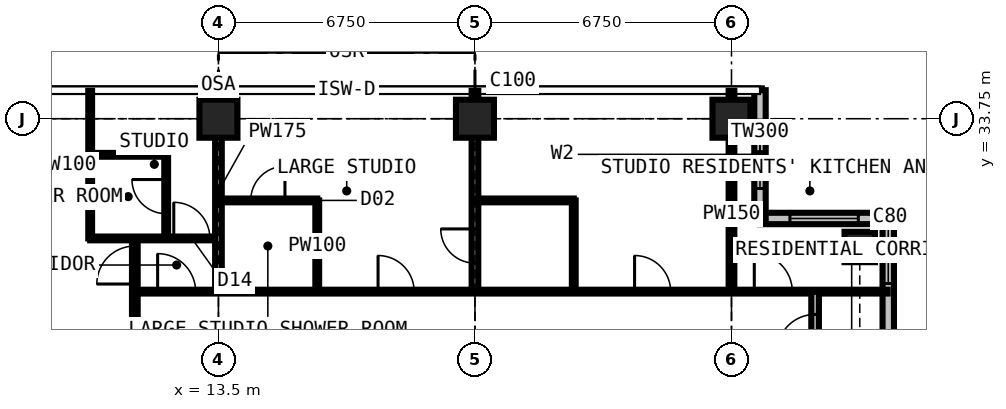
"""IFC4 building model, lengths in metres.
Left out: names, types, materials, properties, quantities, classifications, styles, units other than length and angle.
Written with IfcOpenShell. Run it as: python <this file> out.ifc"""

import sys

from ifc_helpers import new_model, si_unit, direction, frame, frame_2d, origin, origin_2d, place, context, subcontext, project, spatial, rectangle, extrude, element, fill, save


model = new_model("IFC4")
c1 = context("Model", 3, precision=1e-05, world=origin(), true_north=direction((0.0, 1.0)))
c2 = subcontext(c1, "Body", "Model", "MODEL_VIEW")
j1 = project(units=[si_unit("LENGTHUNIT", "METRE"), si_unit("PLANEANGLEUNIT", "RADIAN")], contexts=[c1])
p1 = place(None, origin())
s1 = spatial("IfcSite", under=j1, at=p1, CompositionType="ELEMENT")
p2 = place(p1, origin())
s2 = spatial("IfcBuilding", under=s1, at=p2, CompositionType="ELEMENT")
p3 = place(p2, frame((0.0, 0.0, 236.7)))
s3 = spatial("IfcBuildingStorey", under=s2, at=p3, CompositionType="ELEMENT", Elevation=236.7)
for number, where, z_axis, x_axis in (
    (1, (13.5, 33.75, 0.0), (0.0, 0.0, 1.0), (1.0, 0.0, 0.0)),
    (2, (20.25, 33.75, 0.0), (0.0, 0.0, 1.0), (1.0, 0.0, 0.0)),
    (3, (27.0, 33.75, 0.0), (0.0, 0.0, 1.0), (1.0, 0.0, 0.0)),
):
    element("IfcColumn", number, at=place(p3, frame(where, z_axis=z_axis, x_axis=x_axis)), inside=s3, PredefinedType="COLUMN", context=c2, shape_type="SweptSolid", body=[
        extrude(rectangle(XDim=1.0, YDim=1.0, at=origin_2d()), origin(), (0.0, 0.0, 1.0), 3.6),
    ])
p4 = place(p3, frame((30.375, 30.375, 0.0), z_axis=(0.0, 0.0, 1.0), x_axis=(1.0, 0.0, 0.0)))
e4 = element("IfcColumn", 4, at=p4, inside=s3, PredefinedType="COLUMN", context=c2, shape_type="SweptSolid", body=[
    extrude(rectangle(XDim=0.8, YDim=0.8, at=origin_2d()), origin(), (0.0, 0.0, 1.0), 3.6),
])
p5 = place(p3, frame((31.125, 27.75, 0.0), z_axis=(0.0, 0.0, 1.0), x_axis=(0.0, 1.0, 0.0)))
e5 = element("IfcWall", 5, at=p5, inside=s3, PredefinedType="SOLIDWALL", context=c2, shape_type="SweptSolid", body=[
    extrude(rectangle(XDim=3.375, YDim=0.3, at=frame_2d((1.688, 0.0))), origin(), (0.0, 0.0, 1.0), 3.375),
])
p6 = place(p5, frame((1.663, 0.0, 0.9)))
e6 = element("IfcOpeningElement", 6, at=p6, cuts=e5, PredefinedType="OPENING", context=c2, shape_type="SweptSolid", body=[
    extrude(rectangle(XDim=1.5, YDim=1.8, at=frame_2d((0.75, 0.9))), frame((0.0, 0.16, 0.0), z_axis=(0.0, -1.0, 0.0), x_axis=(1.0, 0.0, 0.0)), (0.0, 0.0, 1.0), 0.32),
])
p7 = place(p3, frame((31.125, 31.125, 0.0), z_axis=(0.0, 0.0, 1.0), x_axis=(-1.0, 0.0, 0.0)))
e7 = element("IfcWall", 7, at=p7, inside=s3, PredefinedType="SOLIDWALL", context=c2, shape_type="SweptSolid", body=[
    extrude(rectangle(XDim=3.375, YDim=0.3, at=frame_2d((1.688, 0.0))), origin(), (0.0, 0.0, 1.0), 3.375),
])
p8 = place(p7, frame((0.788, 0.0, 0.6)))
e8 = element("IfcOpeningElement", 8, at=p8, cuts=e7, PredefinedType="OPENING", context=c2, shape_type="SweptSolid", body=[
    extrude(rectangle(XDim=1.8, YDim=2.1, at=frame_2d((0.9, 1.05))), frame((0.0, 0.16, 0.0), z_axis=(0.0, -1.0, 0.0), x_axis=(1.0, 0.0, 0.0)), (0.0, 0.0, 1.0), 0.32),
])
p9 = place(p3, frame((27.75, 31.125, 0.0), z_axis=(0.0, 0.0, 1.0), x_axis=(0.0, 1.0, 0.0)))
e9 = element("IfcWall", 9, at=p9, inside=s3, PredefinedType="SOLIDWALL", context=c2, shape_type="SweptSolid", body=[
    extrude(rectangle(XDim=3.375, YDim=0.3, at=frame_2d((1.688, 0.0))), origin(), (0.0, 0.0, 1.0), 3.375),
])
p10 = place(p9, frame((0.788, 0.0, 0.6)))
e10 = element("IfcOpeningElement", 10, at=p10, cuts=e9, PredefinedType="OPENING", context=c2, shape_type="SweptSolid", body=[
    extrude(rectangle(XDim=1.8, YDim=2.1, at=frame_2d((0.9, 1.05))), frame((0.0, 0.16, 0.0), z_axis=(0.0, -1.0, 0.0), x_axis=(1.0, 0.0, 0.0)), (0.0, 0.0, 1.0), 0.32),
])
p11 = place(p3, frame((10.125, 30.6, 0.0), z_axis=(0.0, 0.0, 1.0), x_axis=(0.0, 1.0, 0.0)))
e11 = element("IfcWall", 11, at=p11, inside=s3, PredefinedType="PARTITIONING", context=c2, shape_type="SweptSolid", body=[
    extrude(rectangle(XDim=3.884, YDim=0.1, at=frame_2d((1.942, 0.0))), origin(), (0.0, 0.0, 1.0), 3.375),
])
p12 = place(p3, frame((10.125, 30.6, 0.0), z_axis=(0.0, 0.0, 1.0), x_axis=(1.0, 0.0, 0.0)))
e12 = element("IfcWall", 12, at=p12, inside=s3, PredefinedType="PARTITIONING", context=c2, shape_type="SweptSolid", body=[
    extrude(rectangle(XDim=3.375, YDim=0.1, at=frame_2d((1.688, 0.0))), origin(), (0.0, 0.0, 1.0), 3.375),
])
p13 = place(p12, frame((2.2, 0.0, 0.0)))
e13 = element("IfcOpeningElement", 13, at=p13, cuts=e12, PredefinedType="OPENING", context=c2, shape_type="SweptSolid", body=[
    extrude(rectangle(XDim=0.95, YDim=2.2, at=frame_2d((0.475, 1.1))), frame((0.0, 0.06, 0.0), z_axis=(0.0, -1.0, 0.0), x_axis=(1.0, 0.0, 0.0)), (0.0, 0.0, 1.0), 0.12),
])
p14 = place(p3, frame((10.125, 32.8, 0.0), z_axis=(0.0, 0.0, 1.0), x_axis=(1.0, 0.0, 0.0)))
e14 = element("IfcWall", 14, at=p14, inside=s3, PredefinedType="PARTITIONING", context=c2, shape_type="SweptSolid", body=[
    extrude(rectangle(XDim=2.0, YDim=0.1, at=frame_2d((1.0, 0.0))), origin(), (0.0, 0.0, 1.0), 3.375),
])
p15 = place(p3, frame((11.3, 11.3, 0.0), z_axis=(0.0, 0.0, 1.0), x_axis=(0.0, 1.0, 0.0)))
e15 = element("IfcWall", 15, at=p15, inside=s3, PredefinedType="PARTITIONING", context=c2, shape_type="SweptSolid", body=[
    extrude(rectangle(XDim=19.3, YDim=0.15, at=frame_2d((9.65, 0.0))), origin(), (0.0, 0.0, 1.0), 3.375),
])
p16 = place(p15, frame((18.1, 0.0, 0.0)))
e16 = element("IfcOpeningElement", 16, at=p16, cuts=e15, PredefinedType="OPENING", context=c2, shape_type="SweptSolid", body=[
    extrude(rectangle(XDim=1.0, YDim=2.2, at=frame_2d((0.5, 1.1))), frame((0.0, 0.085, 0.0), z_axis=(0.0, -1.0, 0.0), x_axis=(1.0, 0.0, 0.0)), (0.0, 0.0, 1.0), 0.17),
])
p17 = place(p15, frame((10.137, 0.0, 0.0)))
e17 = element("IfcOpeningElement", 17, at=p17, cuts=e15, PredefinedType="OPENING", context=c2, shape_type="SweptSolid", body=[
    extrude(rectangle(XDim=1.0, YDim=2.2, at=frame_2d((0.5, 1.1))), frame((0.0, 0.085, 0.0), z_axis=(0.0, -1.0, 0.0), x_axis=(1.0, 0.0, 0.0)), (0.0, 0.0, 1.0), 0.17),
])
p18 = place(p3, frame((11.3, 29.2, 0.0), z_axis=(0.0, 0.0, 1.0), x_axis=(1.0, 0.0, 0.0)))
e18 = element("IfcWall", 18, at=p18, inside=s3, PredefinedType="PARTITIONING", context=c2, shape_type="SweptSolid", body=[
    extrude(rectangle(XDim=19.809, YDim=0.1, at=frame_2d((9.904, 0.0))), origin(), (0.0, 0.0, 1.0), 3.375),
])
p19 = place(p18, frame((16.3, 0.0, 0.0)))
e19 = element("IfcOpeningElement", 19, at=p19, cuts=e18, PredefinedType="OPENING", context=c2, shape_type="SweptSolid", body=[
    extrude(rectangle(XDim=1.0, YDim=2.2, at=frame_2d((0.5, 1.1))), frame((0.0, 0.06, 0.0), z_axis=(0.0, -1.0, 0.0), x_axis=(1.0, 0.0, 0.0)), (0.0, 0.0, 1.0), 0.12),
])
p20 = place(p18, frame((6.4, 0.0, 0.0)))
e20 = element("IfcOpeningElement", 20, at=p20, cuts=e18, PredefinedType="OPENING", context=c2, shape_type="SweptSolid", body=[
    extrude(rectangle(XDim=0.95, YDim=2.2, at=frame_2d((0.475, 1.1))), frame((0.0, 0.06, 0.0), z_axis=(0.0, -1.0, 0.0), x_axis=(1.0, 0.0, 0.0)), (0.0, 0.0, 1.0), 0.12),
])
p21 = place(p18, frame((13.15, 0.0, 0.0)))
e21 = element("IfcOpeningElement", 21, at=p21, cuts=e18, PredefinedType="OPENING", context=c2, shape_type="SweptSolid", body=[
    extrude(rectangle(XDim=0.95, YDim=2.2, at=frame_2d((0.475, 1.1))), frame((0.0, 0.06, 0.0), z_axis=(0.0, -1.0, 0.0), x_axis=(1.0, 0.0, 0.0)), (0.0, 0.0, 1.0), 0.12),
])
p22 = place(p18, frame((0.6, 0.0, 0.0)))
e22 = element("IfcOpeningElement", 22, at=p22, cuts=e18, PredefinedType="OPENING", context=c2, shape_type="SweptSolid", body=[
    extrude(rectangle(XDim=1.0, YDim=2.2, at=frame_2d((0.5, 1.1))), frame((0.0, 0.06, 0.0), z_axis=(0.0, -1.0, 0.0), x_axis=(1.0, 0.0, 0.0)), (0.0, 0.0, 1.0), 0.12),
])
p23 = place(p3, frame((12.125, 30.6, 0.0), z_axis=(0.0, 0.0, 1.0), x_axis=(0.0, 1.0, 0.0)))
e23 = element("IfcWall", 23, at=p23, inside=s3, PredefinedType="PARTITIONING", context=c2, shape_type="SweptSolid", body=[
    extrude(rectangle(XDim=2.2, YDim=0.1, at=frame_2d((1.1, 0.0))), origin(), (0.0, 0.0, 1.0), 3.375),
])
p24 = place(p23, frame((0.65, 0.0, 0.0)))
e24 = element("IfcOpeningElement", 24, at=p24, cuts=e23, PredefinedType="OPENING", context=c2, shape_type="SweptSolid", body=[
    extrude(rectangle(XDim=0.9, YDim=2.2, at=frame_2d((0.45, 1.1))), frame((0.0, 0.06, 0.0), z_axis=(0.0, -1.0, 0.0), x_axis=(1.0, 0.0, 0.0)), (0.0, 0.0, 1.0), 0.12),
])
p25 = place(p3, frame((13.5, 29.2, 0.0), z_axis=(0.0, 0.0, 1.0), x_axis=(0.0, 1.0, 0.0)))
e25 = element("IfcWall", 25, at=p25, inside=s3, PredefinedType="PARTITIONING", context=c2, shape_type="SweptSolid", body=[
    extrude(rectangle(XDim=5.284, YDim=0.175, at=frame_2d((2.642, 0.0))), origin(), (0.0, 0.0, 1.0), 2.61),
])
p26 = place(p3, frame((13.5, 31.6, 0.0), z_axis=(0.0, 0.0, 1.0), x_axis=(1.0, 0.0, 0.0)))
e26 = element("IfcWall", 26, at=p26, inside=s3, PredefinedType="PARTITIONING", context=c2, shape_type="SweptSolid", body=[
    extrude(rectangle(XDim=2.6, YDim=0.1, at=frame_2d((1.3, 0.0))), origin(), (0.0, 0.0, 1.0), 3.375),
])
p27 = place(p26, frame((0.85, 0.0, 0.0)))
e27 = element("IfcOpeningElement", 27, at=p27, cuts=e26, PredefinedType="OPENING", context=c2, shape_type="SweptSolid", body=[
    extrude(rectangle(XDim=0.9, YDim=2.2, at=frame_2d((0.45, 1.1))), frame((0.0, 0.06, 0.0), z_axis=(0.0, -1.0, 0.0), x_axis=(1.0, 0.0, 0.0)), (0.0, 0.0, 1.0), 0.12),
])
p28 = place(p3, frame((16.1, 29.2, 0.0), z_axis=(0.0, 0.0, 1.0), x_axis=(0.0, 1.0, 0.0)))
e28 = element("IfcWall", 28, at=p28, inside=s3, PredefinedType="PARTITIONING", context=c2, shape_type="SweptSolid", body=[
    extrude(rectangle(XDim=2.4, YDim=0.1, at=frame_2d((1.2, 0.0))), origin(), (0.0, 0.0, 1.0), 3.375),
])
p29 = place(p3, frame((20.25, 29.2, 0.0), z_axis=(0.0, 0.0, 1.0), x_axis=(0.0, 1.0, 0.0)))
e29 = element("IfcWall", 29, at=p29, inside=s3, PredefinedType="PARTITIONING", context=c2, shape_type="SweptSolid", body=[
    extrude(rectangle(XDim=5.284, YDim=0.175, at=frame_2d((2.642, 0.0))), origin(), (0.0, 0.0, 1.0), 2.61),
])
p30 = place(p29, frame((0.75, 0.0, 0.0)))
e30 = element("IfcOpeningElement", 30, at=p30, cuts=e29, PredefinedType="OPENING", context=c2, shape_type="SweptSolid", body=[
    extrude(rectangle(XDim=0.9, YDim=2.2, at=frame_2d((0.45, 1.1))), frame((0.0, 0.097, 0.0), z_axis=(0.0, -1.0, 0.0), x_axis=(1.0, 0.0, 0.0)), (0.0, 0.0, 1.0), 0.195),
])
p31 = place(p3, frame((20.25, 31.6, 0.0), z_axis=(0.0, 0.0, 1.0), x_axis=(1.0, 0.0, 0.0)))
e31 = element("IfcWall", 31, at=p31, inside=s3, PredefinedType="PARTITIONING", context=c2, shape_type="SweptSolid", body=[
    extrude(rectangle(XDim=2.6, YDim=0.1, at=frame_2d((1.3, 0.0))), origin(), (0.0, 0.0, 1.0), 3.375),
])
p32 = place(p3, frame((22.85, 29.2, 0.0), z_axis=(0.0, 0.0, 1.0), x_axis=(0.0, 1.0, 0.0)))
e32 = element("IfcWall", 32, at=p32, inside=s3, PredefinedType="PARTITIONING", context=c2, shape_type="SweptSolid", body=[
    extrude(rectangle(XDim=2.4, YDim=0.1, at=frame_2d((1.2, 0.0))), origin(), (0.0, 0.0, 1.0), 3.375),
])
p33 = place(p3, frame((27.0, 29.2, 0.0), z_axis=(0.0, 0.0, 1.0), x_axis=(0.0, 1.0, 0.0)))
e33 = element("IfcWall", 33, at=p33, inside=s3, PredefinedType="PARTITIONING", context=c2, shape_type="SweptSolid", body=[
    extrude(rectangle(XDim=5.284, YDim=0.15, at=frame_2d((2.642, 0.0))), origin(), (0.0, 0.0, 1.0), 2.877),
])
p34 = place(p3, frame((29.2, 11.3, 0.0), z_axis=(0.0, 0.0, 1.0), x_axis=(0.0, 1.0, 0.0)))
e34 = element("IfcWall", 34, at=p34, inside=s3, PredefinedType="PARTITIONING", context=c2, shape_type="SweptSolid", body=[
    extrude(rectangle(XDim=17.9, YDim=0.2, at=frame_2d((8.95, 0.0))), origin(), (0.0, 0.0, 1.0), 3.375),
])
p35 = place(p34, frame((0.6, 0.0, 0.0)))
e35 = element("IfcOpeningElement", 35, at=p35, cuts=e34, PredefinedType="OPENING", context=c2, shape_type="SweptSolid", body=[
    extrude(rectangle(XDim=1.0, YDim=2.2, at=frame_2d((0.5, 1.1))), frame((0.0, 0.11, 0.0), z_axis=(0.0, -1.0, 0.0), x_axis=(1.0, 0.0, 0.0)), (0.0, 0.0, 1.0), 0.22),
])
p36 = place(p34, frame((10.55, 0.0, 0.0)))
e36 = element("IfcOpeningElement", 36, at=p36, cuts=e34, PredefinedType="OPENING", context=c2, shape_type="SweptSolid", body=[
    extrude(rectangle(XDim=0.95, YDim=2.2, at=frame_2d((0.475, 1.1))), frame((0.0, 0.11, 0.0), z_axis=(0.0, -1.0, 0.0), x_axis=(1.0, 0.0, 0.0)), (0.0, 0.0, 1.0), 0.22),
])
p37 = place(p34, frame((3.8, 0.0, 0.0)))
e37 = element("IfcOpeningElement", 37, at=p37, cuts=e34, PredefinedType="OPENING", context=c2, shape_type="SweptSolid", body=[
    extrude(rectangle(XDim=0.95, YDim=2.2, at=frame_2d((0.475, 1.1))), frame((0.0, 0.11, 0.0), z_axis=(0.0, -1.0, 0.0), x_axis=(1.0, 0.0, 0.0)), (0.0, 0.0, 1.0), 0.22),
])
p38 = place(p34, frame((16.3, 0.0, 0.0)))
e38 = element("IfcOpeningElement", 38, at=p38, cuts=e34, PredefinedType="OPENING", context=c2, shape_type="SweptSolid", body=[
    extrude(rectangle(XDim=1.0, YDim=2.2, at=frame_2d((0.5, 1.1))), frame((0.0, 0.11, 0.0), z_axis=(0.0, -1.0, 0.0), x_axis=(1.0, 0.0, 0.0)), (0.0, 0.0, 1.0), 0.22),
])
p39 = place(p6, origin())
e39 = element("IfcWindow", 39, at=p39, inside=s3, PartitioningType="SINGLE_PANEL", PredefinedType="WINDOW", context=c2, shape_type="SweptSolid", body=[
    extrude(rectangle(XDim=1.5, YDim=1.8, at=frame_2d((0.75, 0.9))), frame((0.0, 0.03, 0.0), z_axis=(0.0, -1.0, 0.0), x_axis=(1.0, 0.0, 0.0)), (0.0, 0.0, 1.0), 0.06),
])
fill(e6, e39)
p40 = place(p8, origin())
e40 = element("IfcWindow", 40, at=p40, inside=s3, PartitioningType="SINGLE_PANEL", PredefinedType="WINDOW", context=c2, shape_type="SweptSolid", body=[
    extrude(rectangle(XDim=1.8, YDim=2.1, at=frame_2d((0.9, 1.05))), frame((0.0, 0.03, 0.0), z_axis=(0.0, -1.0, 0.0), x_axis=(1.0, 0.0, 0.0)), (0.0, 0.0, 1.0), 0.06),
])
fill(e8, e40)
p41 = place(p10, origin())
e41 = element("IfcWindow", 41, at=p41, inside=s3, PartitioningType="SINGLE_PANEL", PredefinedType="WINDOW", context=c2, shape_type="SweptSolid", body=[
    extrude(rectangle(XDim=1.8, YDim=2.1, at=frame_2d((0.9, 1.05))), frame((0.0, 0.03, 0.0), z_axis=(0.0, -1.0, 0.0), x_axis=(1.0, 0.0, 0.0)), (0.0, 0.0, 1.0), 0.06),
])
fill(e10, e41)
p42 = place(p38, origin())
e42 = element("IfcDoor", 42, at=p42, inside=s3, OperationType="SINGLE_SWING_LEFT", PredefinedType="DOOR", context=c2, shape_type="SweptSolid", body=[
    extrude(rectangle(XDim=1.0, YDim=2.2, at=frame_2d((0.5, 1.1))), frame((0.0, 0.025, 0.0), z_axis=(0.0, -1.0, 0.0), x_axis=(1.0, 0.0, 0.0)), (0.0, 0.0, 1.0), 0.05),
])
fill(e38, e42)
p43 = place(p19, origin())
e43 = element("IfcDoor", 43, at=p43, inside=s3, OperationType="SINGLE_SWING_LEFT", PredefinedType="DOOR", context=c2, shape_type="SweptSolid", body=[
    extrude(rectangle(XDim=1.0, YDim=2.2, at=frame_2d((0.5, 1.1))), frame((0.0, 0.025, 0.0), z_axis=(0.0, -1.0, 0.0), x_axis=(1.0, 0.0, 0.0)), (0.0, 0.0, 1.0), 0.05),
])
fill(e19, e43)
p44 = place(p20, origin())
e44 = element("IfcDoor", 44, at=p44, inside=s3, OperationType="SINGLE_SWING_LEFT", PredefinedType="DOOR", context=c2, shape_type="SweptSolid", body=[
    extrude(rectangle(XDim=0.95, YDim=2.2, at=frame_2d((0.475, 1.1))), frame((0.0, 0.025, 0.0), z_axis=(0.0, -1.0, 0.0), x_axis=(1.0, 0.0, 0.0)), (0.0, 0.0, 1.0), 0.05),
])
fill(e20, e44)
p45 = place(p27, origin())
e45 = element("IfcDoor", 45, at=p45, inside=s3, OperationType="SINGLE_SWING_RIGHT", PredefinedType="DOOR", context=c2, shape_type="SweptSolid", body=[
    extrude(rectangle(XDim=0.9, YDim=2.2, at=frame_2d((0.45, 1.1))), frame((0.0, 0.025, 0.0), z_axis=(0.0, -1.0, 0.0), x_axis=(1.0, 0.0, 0.0)), (0.0, 0.0, 1.0), 0.05),
])
fill(e27, e45)
p46 = place(p21, origin())
e46 = element("IfcDoor", 46, at=p46, inside=s3, OperationType="SINGLE_SWING_LEFT", PredefinedType="DOOR", context=c2, shape_type="SweptSolid", body=[
    extrude(rectangle(XDim=0.95, YDim=2.2, at=frame_2d((0.475, 1.1))), frame((0.0, 0.025, 0.0), z_axis=(0.0, -1.0, 0.0), x_axis=(1.0, 0.0, 0.0)), (0.0, 0.0, 1.0), 0.05),
])
fill(e21, e46)
p47 = place(p30, origin())
e47 = element("IfcDoor", 47, at=p47, inside=s3, OperationType="SINGLE_SWING_RIGHT", PredefinedType="DOOR", context=c2, shape_type="SweptSolid", body=[
    extrude(rectangle(XDim=0.9, YDim=2.2, at=frame_2d((0.45, 1.1))), frame((0.0, 0.025, 0.0), z_axis=(0.0, -1.0, 0.0), x_axis=(1.0, 0.0, 0.0)), (0.0, 0.0, 1.0), 0.05),
])
fill(e30, e47)
p48 = place(p13, origin())
e48 = element("IfcDoor", 48, at=p48, inside=s3, OperationType="SINGLE_SWING_LEFT", PredefinedType="DOOR", context=c2, shape_type="SweptSolid", body=[
    extrude(rectangle(XDim=0.95, YDim=2.2, at=frame_2d((0.475, 1.1))), frame((0.0, 0.025, 0.0), z_axis=(0.0, -1.0, 0.0), x_axis=(1.0, 0.0, 0.0)), (0.0, 0.0, 1.0), 0.05),
])
fill(e13, e48)
p49 = place(p24, origin())
e49 = element("IfcDoor", 49, at=p49, inside=s3, OperationType="SINGLE_SWING_RIGHT", PredefinedType="DOOR", context=c2, shape_type="SweptSolid", body=[
    extrude(rectangle(XDim=0.9, YDim=2.2, at=frame_2d((0.45, 1.1))), frame((0.0, 0.025, 0.0), z_axis=(0.0, -1.0, 0.0), x_axis=(1.0, 0.0, 0.0)), (0.0, 0.0, 1.0), 0.05),
])
fill(e24, e49)
p50 = place(p22, origin())
e50 = element("IfcDoor", 50, at=p50, inside=s3, OperationType="SINGLE_SWING_LEFT", PredefinedType="DOOR", context=c2, shape_type="SweptSolid", body=[
    extrude(rectangle(XDim=1.0, YDim=2.2, at=frame_2d((0.5, 1.1))), frame((0.0, 0.025, 0.0), z_axis=(0.0, -1.0, 0.0), x_axis=(1.0, 0.0, 0.0)), (0.0, 0.0, 1.0), 0.05),
])
fill(e22, e50)
p51 = place(p16, origin())
e51 = element("IfcDoor", 51, at=p51, inside=s3, OperationType="SINGLE_SWING_LEFT", PredefinedType="DOOR", context=c2, shape_type="SweptSolid", body=[
    extrude(rectangle(XDim=1.0, YDim=2.2, at=frame_2d((0.5, 1.1))), frame((0.0, 0.025, 0.0), z_axis=(0.0, -1.0, 0.0), x_axis=(1.0, 0.0, 0.0)), (0.0, 0.0, 1.0), 0.05),
])
fill(e16, e51)
save(model, sys.argv[1])
